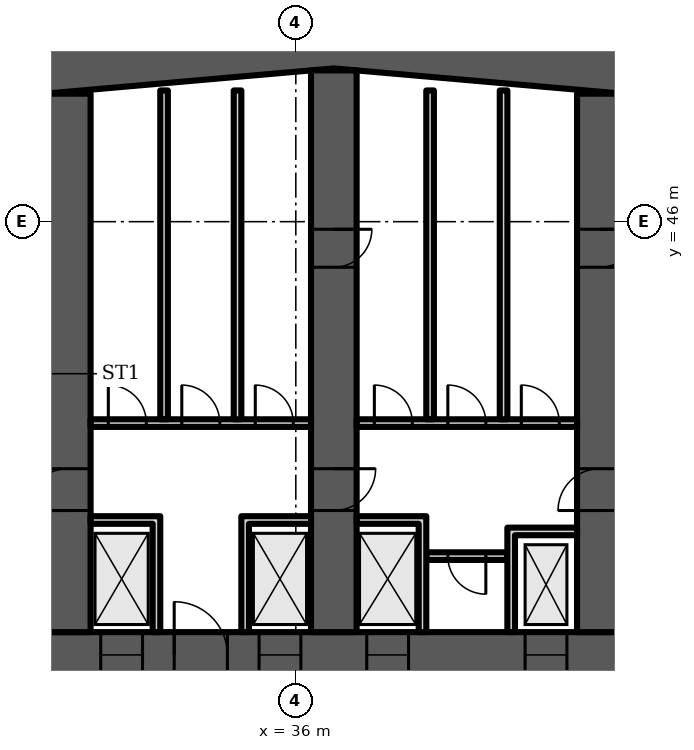
"""IFC4 building model, lengths in metres.
Left out: names, types, materials, properties, quantities, classifications, styles, units other than length and angle.
Written with IfcOpenShell. Run it as: python <this file> out.ifc"""

import sys

from ifc_helpers import new_model, si_unit, direction, frame, frame_2d, origin, place, context, subcontext, project, spatial, polyline, rectangle, outline, extrude, element, fill, save


model = new_model("IFC4")
c1 = context("Model", 3, precision=1e-05, world=origin(), true_north=direction((0.0, 1.0)))
c2 = subcontext(c1, "Body", "Model", "MODEL_VIEW")
j1 = project(units=[si_unit("LENGTHUNIT", "METRE"), si_unit("PLANEANGLEUNIT", "RADIAN")], contexts=[c1])
p1 = place(None, origin())
s1 = spatial("IfcSite", under=j1, at=p1, CompositionType="ELEMENT")
p2 = place(p1, origin())
s2 = spatial("IfcBuilding", under=s1, at=p2, CompositionType="ELEMENT")
p3 = place(p2, frame((0.0, 0.0, 41.5)))
s3 = spatial("IfcBuildingStorey", under=s2, at=p3, CompositionType="ELEMENT", Elevation=41.5)
p4 = place(p3, origin())
e1 = element("IfcWall", 1, at=p4, inside=s3, PredefinedType="SHEAR", context=c2, shape_type="SweptSolid", body=[
    extrude(outline(polyline([(9.0, 47.583), (37.0, 50.032), (65.0, 47.583), (65.0, 48.787), (37.0, 51.237), (9.0, 48.787), (9.0, 47.583)])), origin(), (0.0, 0.0, 1.0), 3.6),
])
p5 = place(p3, frame((9.0, 34.6, 0.0), z_axis=(0.0, 0.0, 1.0), x_axis=(1.0, 0.0, 0.0)))
e2 = element("IfcWall", 2, at=p5, inside=s3, PredefinedType="SHEAR", context=c2, shape_type="SweptSolid", body=[
    extrude(rectangle(XDim=56.0, YDim=1.2, at=frame_2d((28.0, 0.0))), origin(), (0.0, 0.0, 1.0), 3.6),
])
p6 = place(p5, frame((3.3, 0.0, 0.0)))
e3 = element("IfcOpeningElement", 3, at=p6, cuts=e2, PredefinedType="OPENING", context=c2, shape_type="SweptSolid", body=[
    extrude(rectangle(XDim=1.0, YDim=2.1, at=frame_2d((0.5, 1.05))), frame((0.0, 0.61, 0.0), z_axis=(0.0, -1.0, 0.0), x_axis=(1.0, 0.0, 0.0)), (0.0, 0.0, 1.0), 1.22),
])
p7 = place(p5, frame((7.867, 0.0, 0.0)))
e4 = element("IfcOpeningElement", 4, at=p7, cuts=e2, PredefinedType="OPENING", context=c2, shape_type="SweptSolid", body=[
    extrude(rectangle(XDim=1.1, YDim=2.1, at=frame_2d((0.55, 1.05))), frame((0.0, 0.61, 0.0), z_axis=(0.0, -1.0, 0.0), x_axis=(1.0, 0.0, 0.0)), (0.0, 0.0, 1.0), 1.22),
])
p8 = place(p5, frame((12.033, 0.0, 0.0)))
e5 = element("IfcOpeningElement", 5, at=p8, cuts=e2, PredefinedType="OPENING", context=c2, shape_type="SweptSolid", body=[
    extrude(rectangle(XDim=1.1, YDim=2.1, at=frame_2d((0.55, 1.05))), frame((0.0, 0.61, 0.0), z_axis=(0.0, -1.0, 0.0), x_axis=(1.0, 0.0, 0.0)), (0.0, 0.0, 1.0), 1.22),
])
p9 = place(p5, frame((9.8, 0.0, 0.0)))
e6 = element("IfcOpeningElement", 6, at=p9, cuts=e2, PredefinedType="OPENING", context=c2, shape_type="SweptSolid", body=[
    extrude(rectangle(XDim=1.4, YDim=2.1, at=frame_2d((0.7, 1.05))), frame((0.0, 0.61, 0.0), z_axis=(0.0, -1.0, 0.0), x_axis=(1.0, 0.0, 0.0)), (0.0, 0.0, 1.0), 1.22),
])
p10 = place(p5, frame((14.65, 0.0, 0.0)))
e7 = element("IfcOpeningElement", 7, at=p10, cuts=e2, PredefinedType="OPENING", context=c2, shape_type="SweptSolid", body=[
    extrude(rectangle(XDim=1.2, YDim=2.1, at=frame_2d((0.6, 1.05))), frame((0.0, 0.61, 0.0), z_axis=(0.0, -1.0, 0.0), x_axis=(1.0, 0.0, 0.0)), (0.0, 0.0, 1.0), 1.22),
])
p11 = place(p5, frame((21.867, 0.0, 0.0)))
e8 = element("IfcOpeningElement", 8, at=p11, cuts=e2, PredefinedType="OPENING", context=c2, shape_type="SweptSolid", body=[
    extrude(rectangle(XDim=1.1, YDim=2.1, at=frame_2d((0.55, 1.05))), frame((0.0, 0.61, 0.0), z_axis=(0.0, -1.0, 0.0), x_axis=(1.0, 0.0, 0.0)), (0.0, 0.0, 1.0), 1.22),
])
p12 = place(p5, frame((26.033, 0.0, 0.0)))
e9 = element("IfcOpeningElement", 9, at=p12, cuts=e2, PredefinedType="OPENING", context=c2, shape_type="SweptSolid", body=[
    extrude(rectangle(XDim=1.1, YDim=2.1, at=frame_2d((0.55, 1.05))), frame((0.0, 0.61, 0.0), z_axis=(0.0, -1.0, 0.0), x_axis=(1.0, 0.0, 0.0)), (0.0, 0.0, 1.0), 1.22),
])
p13 = place(p5, frame((23.8, 0.0, 0.0)))
e10 = element("IfcOpeningElement", 10, at=p13, cuts=e2, PredefinedType="OPENING", context=c2, shape_type="SweptSolid", body=[
    extrude(rectangle(XDim=1.4, YDim=2.1, at=frame_2d((0.7, 1.05))), frame((0.0, 0.61, 0.0), z_axis=(0.0, -1.0, 0.0), x_axis=(1.0, 0.0, 0.0)), (0.0, 0.0, 1.0), 1.22),
])
p14 = place(p5, frame((28.867, 0.0, 0.0)))
e11 = element("IfcOpeningElement", 11, at=p14, cuts=e2, PredefinedType="OPENING", context=c2, shape_type="SweptSolid", body=[
    extrude(rectangle(XDim=1.1, YDim=2.1, at=frame_2d((0.55, 1.05))), frame((0.0, 0.61, 0.0), z_axis=(0.0, -1.0, 0.0), x_axis=(1.0, 0.0, 0.0)), (0.0, 0.0, 1.0), 1.22),
])
p15 = place(p5, frame((33.033, 0.0, 0.0)))
e12 = element("IfcOpeningElement", 12, at=p15, cuts=e2, PredefinedType="OPENING", context=c2, shape_type="SweptSolid", body=[
    extrude(rectangle(XDim=1.1, YDim=2.1, at=frame_2d((0.55, 1.05))), frame((0.0, 0.61, 0.0), z_axis=(0.0, -1.0, 0.0), x_axis=(1.0, 0.0, 0.0)), (0.0, 0.0, 1.0), 1.22),
])
p16 = place(p5, frame((40.15, 0.0, 0.0)))
e13 = element("IfcOpeningElement", 13, at=p16, cuts=e2, PredefinedType="OPENING", context=c2, shape_type="SweptSolid", body=[
    extrude(rectangle(XDim=1.2, YDim=2.1, at=frame_2d((0.6, 1.05))), frame((0.0, 0.61, 0.0), z_axis=(0.0, -1.0, 0.0), x_axis=(1.0, 0.0, 0.0)), (0.0, 0.0, 1.0), 1.22),
])
p17 = place(p5, frame((44.8, 0.0, 0.0)))
e14 = element("IfcOpeningElement", 14, at=p17, cuts=e2, PredefinedType="OPENING", context=c2, shape_type="SweptSolid", body=[
    extrude(rectangle(XDim=1.4, YDim=2.1, at=frame_2d((0.7, 1.05))), frame((0.0, 0.61, 0.0), z_axis=(0.0, -1.0, 0.0), x_axis=(1.0, 0.0, 0.0)), (0.0, 0.0, 1.0), 1.22),
])
p18 = place(p5, frame((49.867, 0.0, 0.0)))
e15 = element("IfcOpeningElement", 15, at=p18, cuts=e2, PredefinedType="OPENING", context=c2, shape_type="SweptSolid", body=[
    extrude(rectangle(XDim=1.1, YDim=2.1, at=frame_2d((0.55, 1.05))), frame((0.0, 0.61, 0.0), z_axis=(0.0, -1.0, 0.0), x_axis=(1.0, 0.0, 0.0)), (0.0, 0.0, 1.0), 1.22),
])
p19 = place(p5, frame((53.5, 0.0, 0.0)))
e16 = element("IfcOpeningElement", 16, at=p19, cuts=e2, PredefinedType="OPENING", context=c2, shape_type="SweptSolid", body=[
    extrude(rectangle(XDim=1.1, YDim=2.1, at=frame_2d((0.55, 1.05))), frame((0.0, 0.61, 0.0), z_axis=(0.0, -1.0, 0.0), x_axis=(1.0, 0.0, 0.0)), (0.0, 0.0, 1.0), 1.22),
])
p20 = place(p5, frame((51.567, 0.0, 0.0)))
e17 = element("IfcOpeningElement", 17, at=p20, cuts=e2, PredefinedType="OPENING", context=c2, shape_type="SweptSolid", body=[
    extrude(rectangle(XDim=1.4, YDim=2.1, at=frame_2d((0.7, 1.05))), frame((0.0, 0.61, 0.0), z_axis=(0.0, -1.0, 0.0), x_axis=(1.0, 0.0, 0.0)), (0.0, 0.0, 1.0), 1.22),
])
p21 = place(p3, frame((30.0, 35.2, 0.0), z_axis=(0.0, 0.0, 1.0), x_axis=(0.0, 1.0, 0.0)))
e18 = element("IfcWall", 18, at=p21, inside=s3, PredefinedType="SHEAR", context=c2, shape_type="SweptSolid", body=[
    extrude(rectangle(XDim=14.168, YDim=1.2, at=frame_2d((7.084, 0.0))), origin(), (0.0, 0.0, 1.0), 3.6),
])
p22 = place(p21, frame((3.2, 0.0, 0.0)))
e19 = element("IfcOpeningElement", 19, at=p22, cuts=e18, PredefinedType="OPENING", context=c2, shape_type="SweptSolid", body=[
    extrude(rectangle(XDim=1.1, YDim=2.1, at=frame_2d((0.55, 1.05))), frame((0.0, 0.61, 0.0), z_axis=(0.0, -1.0, 0.0), x_axis=(1.0, 0.0, 0.0)), (0.0, 0.0, 1.0), 1.22),
])
p23 = place(p3, frame((37.0, 35.2, 0.0), z_axis=(0.0, 0.0, 1.0), x_axis=(0.0, 1.0, 0.0)))
e20 = element("IfcWall", 20, at=p23, inside=s3, PredefinedType="SHEAR", context=c2, shape_type="SweptSolid", body=[
    extrude(rectangle(XDim=14.78, YDim=1.2, at=frame_2d((7.39, 0.0))), origin(), (0.0, 0.0, 1.0), 3.6),
])
p24 = place(p23, frame((3.2, 0.0, 0.0)))
e21 = element("IfcOpeningElement", 21, at=p24, cuts=e20, PredefinedType="OPENING", context=c2, shape_type="SweptSolid", body=[
    extrude(rectangle(XDim=1.1, YDim=2.1, at=frame_2d((0.55, 1.05))), frame((0.0, 0.61, 0.0), z_axis=(0.0, -1.0, 0.0), x_axis=(1.0, 0.0, 0.0)), (0.0, 0.0, 1.0), 1.22),
])
p25 = place(p23, frame((9.6, 0.0, 0.0)))
e22 = element("IfcOpeningElement", 22, at=p25, cuts=e20, PredefinedType="OPENING", context=c2, shape_type="SweptSolid", body=[
    extrude(rectangle(XDim=1.0, YDim=2.1, at=frame_2d((0.5, 1.05))), frame((0.0, 0.61, 0.0), z_axis=(0.0, -1.0, 0.0), x_axis=(1.0, 0.0, 0.0)), (0.0, 0.0, 1.0), 1.22),
])
p26 = place(p3, frame((44.0, 35.2, 0.0), z_axis=(0.0, 0.0, 1.0), x_axis=(0.0, 1.0, 0.0)))
e23 = element("IfcWall", 23, at=p26, inside=s3, PredefinedType="SHEAR", context=c2, shape_type="SweptSolid", body=[
    extrude(rectangle(XDim=14.168, YDim=1.2, at=frame_2d((7.084, 0.0))), origin(), (0.0, 0.0, 1.0), 3.6),
])
p27 = place(p26, frame((3.2, 0.0, 0.0)))
e24 = element("IfcOpeningElement", 24, at=p27, cuts=e23, PredefinedType="OPENING", context=c2, shape_type="SweptSolid", body=[
    extrude(rectangle(XDim=1.1, YDim=2.1, at=frame_2d((0.55, 1.05))), frame((0.0, 0.61, 0.0), z_axis=(0.0, -1.0, 0.0), x_axis=(1.0, 0.0, 0.0)), (0.0, 0.0, 1.0), 1.22),
])
p28 = place(p26, frame((9.6, 0.0, 0.0)))
e25 = element("IfcOpeningElement", 25, at=p28, cuts=e23, PredefinedType="OPENING", context=c2, shape_type="SweptSolid", body=[
    extrude(rectangle(XDim=1.0, YDim=2.1, at=frame_2d((0.5, 1.05))), frame((0.0, 0.61, 0.0), z_axis=(0.0, -1.0, 0.0), x_axis=(1.0, 0.0, 0.0)), (0.0, 0.0, 1.0), 1.22),
])
p29 = place(p3, frame((30.6, 40.7, 0.0), z_axis=(0.0, 0.0, 1.0), x_axis=(1.0, 0.0, 0.0)))
e26 = element("IfcWall", 26, at=p29, inside=s3, PredefinedType="PARTITIONING", context=c2, shape_type="SweptSolid", body=[
    extrude(rectangle(XDim=5.8, YDim=0.2, at=frame_2d((2.9, 0.0))), origin(), (0.0, 0.0, 1.0), 3.2),
])
p30 = place(p29, frame((0.467, 0.0, 0.0)))
e27 = element("IfcOpeningElement", 27, at=p30, cuts=e26, PredefinedType="OPENING", context=c2, shape_type="SweptSolid", body=[
    extrude(rectangle(XDim=1.0, YDim=2.1, at=frame_2d((0.5, 1.05))), frame((0.0, 0.11, 0.0), z_axis=(0.0, -1.0, 0.0), x_axis=(1.0, 0.0, 0.0)), (0.0, 0.0, 1.0), 0.22),
])
p31 = place(p29, frame((2.4, 0.0, 0.0)))
e28 = element("IfcOpeningElement", 28, at=p31, cuts=e26, PredefinedType="OPENING", context=c2, shape_type="SweptSolid", body=[
    extrude(rectangle(XDim=1.0, YDim=2.1, at=frame_2d((0.5, 1.05))), frame((0.0, 0.11, 0.0), z_axis=(0.0, -1.0, 0.0), x_axis=(1.0, 0.0, 0.0)), (0.0, 0.0, 1.0), 0.22),
])
p32 = place(p29, frame((4.333, 0.0, 0.0)))
e29 = element("IfcOpeningElement", 29, at=p32, cuts=e26, PredefinedType="OPENING", context=c2, shape_type="SweptSolid", body=[
    extrude(rectangle(XDim=1.0, YDim=2.1, at=frame_2d((0.5, 1.05))), frame((0.0, 0.11, 0.0), z_axis=(0.0, -1.0, 0.0), x_axis=(1.0, 0.0, 0.0)), (0.0, 0.0, 1.0), 0.22),
])
p33 = place(p3, frame((0.0, 0.0, -0.0)))
e30 = element("IfcWall", 30, at=p33, inside=s3, PredefinedType="PARTITIONING", context=c2, shape_type="SweptSolid", body=[
    extrude(outline(polyline([(32.233, 38.05), (30.6, 38.05), (30.6, 38.25), (32.233, 38.25), (32.433, 38.25), (32.433, 35.2), (32.233, 35.2), (32.233, 38.05)])), origin(), (0.0, 0.0, 1.0), 3.2),
])
p34 = place(p3, frame((0.0, 0.0, -0.0)))
e31 = element("IfcWall", 31, at=p34, inside=s3, PredefinedType="PARTITIONING", context=c2, shape_type="SweptSolid", body=[
    extrude(outline(polyline([(34.567, 38.25), (34.767, 38.25), (36.4, 38.25), (36.4, 38.05), (34.767, 38.05), (34.767, 35.2), (34.567, 35.2), (34.567, 38.25)])), origin(), (0.0, 0.0, 1.0), 3.2),
])
for number, where, z_axis, x_axis in (
    (32, (32.533, 40.8, 0.0), (0.0, 0.0, 1.0), (0.0, 1.0, 0.0)),
    (33, (34.467, 40.8, 0.0), (0.0, 0.0, 1.0), (0.0, 1.0, 0.0)),
):
    element("IfcWall", number, at=place(p3, frame(where, z_axis=z_axis, x_axis=x_axis)), inside=s3, PredefinedType="PARTITIONING", context=c2, shape_type="SweptSolid", body=[
        extrude(rectangle(XDim=8.653, YDim=0.2, at=frame_2d((4.326, 0.0))), origin(), (0.0, 0.0, 1.0), 3.2),
    ])
p35 = place(p3, frame((39.433, 37.2, 0.0), z_axis=(0.0, 0.0, 1.0), x_axis=(1.0, 0.0, 0.0)))
e34 = element("IfcWall", 34, at=p35, inside=s3, PredefinedType="PARTITIONING", context=c2, shape_type="SweptSolid", body=[
    extrude(rectangle(XDim=2.133, YDim=0.2, at=frame_2d((1.067, 0.0))), origin(), (0.0, 0.0, 1.0), 3.2),
])
p36 = place(p35, frame((0.567, 0.0, 0.0)))
e35 = element("IfcOpeningElement", 35, at=p36, cuts=e34, PredefinedType="OPENING", context=c2, shape_type="SweptSolid", body=[
    extrude(rectangle(XDim=1.0, YDim=2.1, at=frame_2d((0.5, 1.05))), frame((0.0, 0.11, 0.0), z_axis=(0.0, -1.0, 0.0), x_axis=(1.0, 0.0, 0.0)), (0.0, 0.0, 1.0), 0.22),
])
p37 = place(p3, frame((37.6, 40.7, 0.0), z_axis=(0.0, 0.0, 1.0), x_axis=(1.0, 0.0, 0.0)))
e36 = element("IfcWall", 36, at=p37, inside=s3, PredefinedType="PARTITIONING", context=c2, shape_type="SweptSolid", body=[
    extrude(rectangle(XDim=5.8, YDim=0.2, at=frame_2d((2.9, 0.0))), origin(), (0.0, 0.0, 1.0), 3.2),
])
p38 = place(p37, frame((0.467, 0.0, 0.0)))
e37 = element("IfcOpeningElement", 37, at=p38, cuts=e36, PredefinedType="OPENING", context=c2, shape_type="SweptSolid", body=[
    extrude(rectangle(XDim=1.0, YDim=2.1, at=frame_2d((0.5, 1.05))), frame((0.0, 0.11, 0.0), z_axis=(0.0, -1.0, 0.0), x_axis=(1.0, 0.0, 0.0)), (0.0, 0.0, 1.0), 0.22),
])
p39 = place(p37, frame((2.4, 0.0, 0.0)))
e38 = element("IfcOpeningElement", 38, at=p39, cuts=e36, PredefinedType="OPENING", context=c2, shape_type="SweptSolid", body=[
    extrude(rectangle(XDim=1.0, YDim=2.1, at=frame_2d((0.5, 1.05))), frame((0.0, 0.11, 0.0), z_axis=(0.0, -1.0, 0.0), x_axis=(1.0, 0.0, 0.0)), (0.0, 0.0, 1.0), 0.22),
])
p40 = place(p37, frame((4.333, 0.0, 0.0)))
e39 = element("IfcOpeningElement", 39, at=p40, cuts=e36, PredefinedType="OPENING", context=c2, shape_type="SweptSolid", body=[
    extrude(rectangle(XDim=1.0, YDim=2.1, at=frame_2d((0.5, 1.05))), frame((0.0, 0.11, 0.0), z_axis=(0.0, -1.0, 0.0), x_axis=(1.0, 0.0, 0.0)), (0.0, 0.0, 1.0), 0.22),
])
p41 = place(p3, frame((0.0, 0.0, -0.0)))
e40 = element("IfcWall", 40, at=p41, inside=s3, PredefinedType="PARTITIONING", context=c2, shape_type="SweptSolid", body=[
    extrude(outline(polyline([(41.567, 37.95), (41.767, 37.95), (43.4, 37.95), (43.4, 37.75), (41.767, 37.75), (41.767, 35.2), (41.567, 35.2), (41.567, 37.95)])), origin(), (0.0, 0.0, 1.0), 3.2),
])
p42 = place(p3, frame((0.0, 0.0, -0.0)))
e41 = element("IfcWall", 41, at=p42, inside=s3, PredefinedType="PARTITIONING", context=c2, shape_type="SweptSolid", body=[
    extrude(outline(polyline([(39.233, 38.05), (37.6, 38.05), (37.6, 38.25), (39.233, 38.25), (39.433, 38.25), (39.433, 35.2), (39.233, 35.2), (39.233, 38.05)])), origin(), (0.0, 0.0, 1.0), 3.2),
])
for number, where, z_axis, x_axis in (
    (42, (39.533, 40.8, 0.0), (0.0, 0.0, 1.0), (0.0, 1.0, 0.0)),
    (43, (41.467, 40.8, 0.0), (0.0, 0.0, 1.0), (0.0, 1.0, 0.0)),
):
    element("IfcWall", number, at=place(p3, frame(where, z_axis=z_axis, x_axis=x_axis)), inside=s3, PredefinedType="PARTITIONING", context=c2, shape_type="SweptSolid", body=[
        extrude(rectangle(XDim=8.653, YDim=0.2, at=frame_2d((4.326, 0.0))), origin(), (0.0, 0.0, 1.0), 3.2),
    ])
p43 = place(p11, origin())
e44 = element("IfcDoor", 44, at=p43, inside=s3, OperationType="DOUBLE_DOOR_SLIDING", PredefinedType="DOOR", context=c2, shape_type="SweptSolid", body=[
    extrude(rectangle(XDim=1.1, YDim=2.1, at=frame_2d((0.55, 1.05))), frame((0.0, 0.025, 0.0), z_axis=(0.0, -1.0, 0.0), x_axis=(1.0, 0.0, 0.0)), (0.0, 0.0, 1.0), 0.05),
])
fill(e8, e44)
p44 = place(p12, origin())
e45 = element("IfcDoor", 45, at=p44, inside=s3, OperationType="DOUBLE_DOOR_SLIDING", PredefinedType="DOOR", context=c2, shape_type="SweptSolid", body=[
    extrude(rectangle(XDim=1.1, YDim=2.1, at=frame_2d((0.55, 1.05))), frame((0.0, 0.025, 0.0), z_axis=(0.0, -1.0, 0.0), x_axis=(1.0, 0.0, 0.0)), (0.0, 0.0, 1.0), 0.05),
])
fill(e9, e45)
p45 = place(p13, origin())
e46 = element("IfcDoor", 46, at=p45, inside=s3, OperationType="DOUBLE_DOOR_SINGLE_SWING", PredefinedType="DOOR", context=c2, shape_type="SweptSolid", body=[
    extrude(rectangle(XDim=1.4, YDim=2.1, at=frame_2d((0.7, 1.05))), frame((0.0, 0.025, 0.0), z_axis=(0.0, -1.0, 0.0), x_axis=(1.0, 0.0, 0.0)), (0.0, 0.0, 1.0), 0.05),
])
fill(e10, e46)
p46 = place(p30, origin())
e47 = element("IfcDoor", 47, at=p46, inside=s3, OperationType="SINGLE_SWING_LEFT", PredefinedType="DOOR", context=c2, shape_type="SweptSolid", body=[
    extrude(rectangle(XDim=1.0, YDim=2.1, at=frame_2d((0.5, 1.05))), frame((0.0, 0.025, 0.0), z_axis=(0.0, -1.0, 0.0), x_axis=(1.0, 0.0, 0.0)), (0.0, 0.0, 1.0), 0.05),
])
fill(e27, e47)
p47 = place(p31, origin())
e48 = element("IfcDoor", 48, at=p47, inside=s3, OperationType="SINGLE_SWING_LEFT", PredefinedType="DOOR", context=c2, shape_type="SweptSolid", body=[
    extrude(rectangle(XDim=1.0, YDim=2.1, at=frame_2d((0.5, 1.05))), frame((0.0, 0.025, 0.0), z_axis=(0.0, -1.0, 0.0), x_axis=(1.0, 0.0, 0.0)), (0.0, 0.0, 1.0), 0.05),
])
fill(e28, e48)
p48 = place(p32, origin())
e49 = element("IfcDoor", 49, at=p48, inside=s3, OperationType="SINGLE_SWING_LEFT", PredefinedType="DOOR", context=c2, shape_type="SweptSolid", body=[
    extrude(rectangle(XDim=1.0, YDim=2.1, at=frame_2d((0.5, 1.05))), frame((0.0, 0.025, 0.0), z_axis=(0.0, -1.0, 0.0), x_axis=(1.0, 0.0, 0.0)), (0.0, 0.0, 1.0), 0.05),
])
fill(e29, e49)
p49 = place(p36, origin())
e50 = element("IfcDoor", 50, at=p49, inside=s3, OperationType="SINGLE_SWING_RIGHT", PredefinedType="DOOR", context=c2, shape_type="SweptSolid", body=[
    extrude(rectangle(XDim=1.0, YDim=2.1, at=frame_2d((0.5, 1.05))), frame((0.0, 0.025, 0.0), z_axis=(0.0, -1.0, 0.0), x_axis=(1.0, 0.0, 0.0)), (0.0, 0.0, 1.0), 0.05),
])
fill(e35, e50)
p50 = place(p14, origin())
e51 = element("IfcDoor", 51, at=p50, inside=s3, OperationType="DOUBLE_DOOR_SLIDING", PredefinedType="DOOR", context=c2, shape_type="SweptSolid", body=[
    extrude(rectangle(XDim=1.1, YDim=2.1, at=frame_2d((0.55, 1.05))), frame((0.0, 0.025, 0.0), z_axis=(0.0, -1.0, 0.0), x_axis=(1.0, 0.0, 0.0)), (0.0, 0.0, 1.0), 0.05),
])
fill(e11, e51)
p51 = place(p15, origin())
e52 = element("IfcDoor", 52, at=p51, inside=s3, OperationType="DOUBLE_DOOR_SLIDING", PredefinedType="DOOR", context=c2, shape_type="SweptSolid", body=[
    extrude(rectangle(XDim=1.1, YDim=2.1, at=frame_2d((0.55, 1.05))), frame((0.0, 0.025, 0.0), z_axis=(0.0, -1.0, 0.0), x_axis=(1.0, 0.0, 0.0)), (0.0, 0.0, 1.0), 0.05),
])
fill(e12, e52)
p52 = place(p38, origin())
e53 = element("IfcDoor", 53, at=p52, inside=s3, OperationType="SINGLE_SWING_LEFT", PredefinedType="DOOR", context=c2, shape_type="SweptSolid", body=[
    extrude(rectangle(XDim=1.0, YDim=2.1, at=frame_2d((0.5, 1.05))), frame((0.0, 0.025, 0.0), z_axis=(0.0, -1.0, 0.0), x_axis=(1.0, 0.0, 0.0)), (0.0, 0.0, 1.0), 0.05),
])
fill(e37, e53)
p53 = place(p39, origin())
e54 = element("IfcDoor", 54, at=p53, inside=s3, OperationType="SINGLE_SWING_LEFT", PredefinedType="DOOR", context=c2, shape_type="SweptSolid", body=[
    extrude(rectangle(XDim=1.0, YDim=2.1, at=frame_2d((0.5, 1.05))), frame((0.0, 0.025, 0.0), z_axis=(0.0, -1.0, 0.0), x_axis=(1.0, 0.0, 0.0)), (0.0, 0.0, 1.0), 0.05),
])
fill(e38, e54)
p54 = place(p40, origin())
e55 = element("IfcDoor", 55, at=p54, inside=s3, OperationType="SINGLE_SWING_LEFT", PredefinedType="DOOR", context=c2, shape_type="SweptSolid", body=[
    extrude(rectangle(XDim=1.0, YDim=2.1, at=frame_2d((0.5, 1.05))), frame((0.0, 0.025, 0.0), z_axis=(0.0, -1.0, 0.0), x_axis=(1.0, 0.0, 0.0)), (0.0, 0.0, 1.0), 0.05),
])
fill(e39, e55)
p55 = place(p22, origin())
e56 = element("IfcDoor", 56, at=p55, inside=s3, OperationType="SINGLE_SWING_LEFT", PredefinedType="DOOR", context=c2, shape_type="SweptSolid", body=[
    extrude(rectangle(XDim=1.1, YDim=2.1, at=frame_2d((0.55, 1.05))), frame((0.0, 0.025, 0.0), z_axis=(0.0, -1.0, 0.0), x_axis=(1.0, 0.0, 0.0)), (0.0, 0.0, 1.0), 0.05),
])
fill(e19, e56)
p56 = place(p24, origin())
e57 = element("IfcDoor", 57, at=p56, inside=s3, OperationType="SINGLE_SWING_RIGHT", PredefinedType="DOOR", context=c2, shape_type="SweptSolid", body=[
    extrude(rectangle(XDim=1.1, YDim=2.1, at=frame_2d((0.55, 1.05))), frame((0.0, 0.025, 0.0), z_axis=(0.0, -1.0, 0.0), x_axis=(1.0, 0.0, 0.0)), (0.0, 0.0, 1.0), 0.05),
])
fill(e21, e57)
p57 = place(p25, origin())
e58 = element("IfcDoor", 58, at=p57, inside=s3, OperationType="SINGLE_SWING_RIGHT", PredefinedType="DOOR", context=c2, shape_type="SweptSolid", body=[
    extrude(rectangle(XDim=1.0, YDim=2.1, at=frame_2d((0.5, 1.05))), frame((0.0, 0.6, 0.0), z_axis=(0.0, -1.0, 0.0), x_axis=(1.0, 0.0, 0.0)), (0.0, 0.0, 1.0), 1.199),
])
fill(e22, e58)
p58 = place(p27, origin())
e59 = element("IfcDoor", 59, at=p58, inside=s3, OperationType="SINGLE_SWING_LEFT", PredefinedType="DOOR", context=c2, shape_type="SweptSolid", body=[
    extrude(rectangle(XDim=1.1, YDim=2.1, at=frame_2d((0.55, 1.05))), frame((0.0, 0.025, 0.0), z_axis=(0.0, -1.0, 0.0), x_axis=(1.0, 0.0, 0.0)), (0.0, 0.0, 1.0), 0.05),
])
fill(e24, e59)
p59 = place(p28, origin())
e60 = element("IfcDoor", 60, at=p59, inside=s3, OperationType="SINGLE_SWING_RIGHT", PredefinedType="DOOR", context=c2, shape_type="SweptSolid", body=[
    extrude(rectangle(XDim=1.0, YDim=2.1, at=frame_2d((0.5, 1.05))), frame((0.0, 0.6, 0.0), z_axis=(0.0, -1.0, 0.0), x_axis=(1.0, 0.0, 0.0)), (0.0, 0.0, 1.0), 1.199),
])
fill(e25, e60)
save(model, sys.argv[1])
